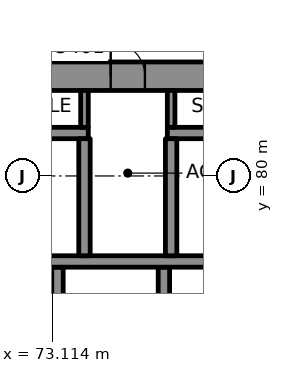
"""IFC4 building model, lengths in metres.
Left out: names, types, materials, properties, quantities, classifications, styles, units other than length and angle.
Written with IfcOpenShell. Run it as: python <this file> out.ifc"""

import sys

from ifc_helpers import new_model, si_unit, direction, frame, frame_2d, origin, place, context, subcontext, project, spatial, rectangle, extrude, element, fill, save


model = new_model("IFC4")
c1 = context("Model", 3, precision=1e-05, world=origin(), true_north=direction((0.0, 1.0)))
c2 = subcontext(c1, "Body", "Model", "MODEL_VIEW")
j1 = project(units=[si_unit("LENGTHUNIT", "METRE"), si_unit("PLANEANGLEUNIT", "RADIAN")], contexts=[c1])
p1 = place(None, origin())
s1 = spatial("IfcSite", under=j1, at=p1, CompositionType="ELEMENT")
p2 = place(p1, origin())
s2 = spatial("IfcBuilding", under=s1, at=p2, CompositionType="ELEMENT")
p3 = place(p2, frame((0.0, 0.0, 229.9)))
s3 = spatial("IfcBuildingStorey", under=s2, at=p3, CompositionType="ELEMENT", Elevation=229.9)
p4 = place(p3, frame((64.0, 82.625, 0.0), z_axis=(0.0, 0.0, 1.0), x_axis=(1.0, 0.0, 0.0)))
e1 = element("IfcWall", 1, at=p4, inside=s3, PredefinedType="SHEAR", context=c2, shape_type="SweptSolid", body=[
    extrude(rectangle(XDim=22.0, YDim=0.75, at=frame_2d((11.0, 0.0))), origin(), (0.0, 0.0, 1.0), 3.7),
])
p5 = place(p4, frame((3.695, 0.0, 0.0)))
e2 = element("IfcOpeningElement", 2, at=p5, cuts=e1, PredefinedType="OPENING", context=c2, shape_type="SweptSolid", body=[
    extrude(rectangle(XDim=1.0, YDim=2.1, at=frame_2d((0.5, 1.05))), frame((0.0, 0.385, 0.0), z_axis=(0.0, -1.0, 0.0), x_axis=(1.0, 0.0, 0.0)), (0.0, 0.0, 1.0), 0.77),
])
p6 = place(p4, frame((17.505, 0.0, 0.0)))
e3 = element("IfcOpeningElement", 3, at=p6, cuts=e1, PredefinedType="OPENING", context=c2, shape_type="SweptSolid", body=[
    extrude(rectangle(XDim=1.0, YDim=2.1, at=frame_2d((0.5, 1.05))), frame((0.0, 0.385, 0.0), z_axis=(0.0, -1.0, 0.0), x_axis=(1.0, 0.0, 0.0)), (0.0, 0.0, 1.0), 0.77),
])
p7 = place(p4, frame((10.65, 0.0, 0.0)))
e4 = element("IfcOpeningElement", 4, at=p7, cuts=e1, PredefinedType="OPENING", context=c2, shape_type="SweptSolid", body=[
    extrude(rectangle(XDim=0.9, YDim=2.1, at=frame_2d((0.45, 1.05))), frame((0.0, 0.385, 0.0), z_axis=(0.0, -1.0, 0.0), x_axis=(1.0, 0.0, 0.0)), (0.0, 0.0, 1.0), 0.77),
])
for number, where, z_axis, x_axis in (
    (5, (73.25, 75.0, 0.0), (0.0, 0.0, 1.0), (0.0, 1.0, 0.0)),
    (6, (76.05, 75.0, 0.0), (0.0, 0.0, 1.0), (0.0, 1.0, 0.0)),
):
    element("IfcWall", number, at=place(p3, frame(where, z_axis=z_axis, x_axis=x_axis)), inside=s3, PredefinedType="SHEAR", context=c2, shape_type="SweptSolid", body=[
        extrude(rectangle(XDim=2.6, YDim=0.3, at=frame_2d((1.3, 0.0))), origin(), (0.0, 0.0, 1.0), 3.7),
    ])
p8 = place(p3, frame((67.15, 77.75, 0.0), z_axis=(0.0, 0.0, 1.0), x_axis=(1.0, 0.0, 0.0)))
e7 = element("IfcWall", 7, at=p8, inside=s3, PredefinedType="SHEAR", context=c2, shape_type="SweptSolid", body=[
    extrude(rectangle(XDim=17.45, YDim=0.3, at=frame_2d((8.725, 0.0))), origin(), (0.0, 0.0, 1.0), 3.7),
])
p9 = place(p8, frame((0.545, 0.0, 0.0)))
e8 = element("IfcOpeningElement", 8, at=p9, cuts=e7, PredefinedType="OPENING", context=c2, shape_type="SweptSolid", body=[
    extrude(rectangle(XDim=1.0, YDim=2.1, at=frame_2d((0.5, 1.05))), frame((0.0, 0.16, 0.0), z_axis=(0.0, -1.0, 0.0), x_axis=(1.0, 0.0, 0.0)), (0.0, 0.0, 1.0), 0.32),
])
p10 = place(p3, frame((67.15, 81.13, 0.0), z_axis=(0.0, 0.0, 1.0), x_axis=(1.0, 0.0, 0.0)))
e9 = element("IfcWall", 9, at=p10, inside=s3, PredefinedType="SHEAR", context=c2, shape_type="SweptSolid", body=[
    extrude(rectangle(XDim=6.91, YDim=0.3, at=frame_2d((3.455, 0.0))), origin(), (0.0, 0.0, 1.0), 3.7),
])
p11 = place(p10, frame((0.545, 0.0, 0.0)))
e10 = element("IfcOpeningElement", 10, at=p11, cuts=e9, PredefinedType="OPENING", context=c2, shape_type="SweptSolid", body=[
    extrude(rectangle(XDim=1.0, YDim=2.1, at=frame_2d((0.5, 1.05))), frame((0.0, 0.16, 0.0), z_axis=(0.0, -1.0, 0.0), x_axis=(1.0, 0.0, 0.0)), (0.0, 0.0, 1.0), 0.32),
])
p12 = place(p3, frame((76.14, 81.13, 0.0), z_axis=(0.0, 0.0, 1.0), x_axis=(1.0, 0.0, 0.0)))
e11 = element("IfcWall", 11, at=p12, inside=s3, PredefinedType="SHEAR", context=c2, shape_type="SweptSolid", body=[
    extrude(rectangle(XDim=6.86, YDim=0.3, at=frame_2d((3.43, 0.0))), origin(), (0.0, 0.0, 1.0), 3.7),
])
p13 = place(p12, frame((5.365, 0.0, 0.0)))
e12 = element("IfcOpeningElement", 12, at=p13, cuts=e11, PredefinedType="OPENING", context=c2, shape_type="SweptSolid", body=[
    extrude(rectangle(XDim=1.0, YDim=2.1, at=frame_2d((0.5, 1.05))), frame((0.0, 0.16, 0.0), z_axis=(0.0, -1.0, 0.0), x_axis=(1.0, 0.0, 0.0)), (0.0, 0.0, 1.0), 0.32),
])
for number, where, z_axis, x_axis in (
    (13, (73.96, 77.9, 0.0), (0.0, 0.0, 1.0), (0.0, 1.0, 0.0)),
    (14, (76.24, 77.9, 0.0), (0.0, 0.0, 1.0), (0.0, 1.0, 0.0)),
):
    element("IfcWall", number, at=place(p3, frame(where, z_axis=z_axis, x_axis=x_axis)), inside=s3, PredefinedType="SHEAR", context=c2, shape_type="SweptSolid", body=[
        extrude(rectangle(XDim=3.08, YDim=0.3, at=frame_2d((1.54, 0.0))), origin(), (0.0, 0.0, 1.0), 3.7),
    ])
for number, where, z_axis, x_axis in (
    (15, (73.96, 81.28, 0.0), (0.0, 0.0, 1.0), (0.0, 1.0, 0.0)),
    (16, (76.24, 81.28, 0.0), (0.0, 0.0, 1.0), (0.0, 1.0, 0.0)),
):
    element("IfcWall", number, at=place(p3, frame(where, z_axis=z_axis, x_axis=x_axis)), inside=s3, PredefinedType="PARTITIONING", context=c2, shape_type="SweptSolid", body=[
        extrude(rectangle(XDim=0.97, YDim=0.2, at=frame_2d((0.485, 0.0))), origin(), (0.0, 0.0, 1.0), 3.7),
    ])
p14 = place(p7, origin())
e17 = element("IfcDoor", 17, at=p14, inside=s3, OperationType="SINGLE_SWING_LEFT", PredefinedType="DOOR", context=c2, shape_type="SweptSolid", body=[
    extrude(rectangle(XDim=0.9, YDim=2.1, at=frame_2d((0.45, 1.05))), frame((0.0, 0.095, 0.0), z_axis=(0.0, -1.0, 0.0), x_axis=(1.0, 0.0, 0.0)), (0.0, 0.0, 1.0), 0.19),
])
fill(e4, e17)
save(model, sys.argv[1])
